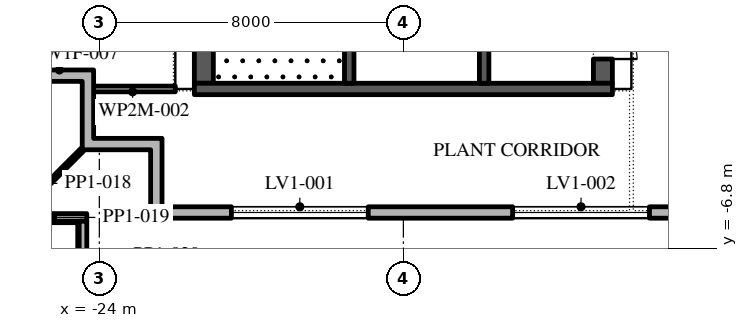
"""IFC4 building model, lengths in metres.
Left out: names, types, materials, properties, quantities, classifications, styles, units other than length and angle.
Written with IfcOpenShell. Run it as: python <this file> out.ifc"""

import sys

from ifc_helpers import new_model, si_unit, direction, frame, frame_2d, origin, place, context, subcontext, project, spatial, polyline, rectangle, outline, extrude, element, fill, save


model = new_model("IFC4")
c1 = context("Model", 3, precision=1e-05, world=origin(), true_north=direction((0.0, 1.0)))
c2 = subcontext(c1, "Body", "Model", "MODEL_VIEW")
j1 = project(units=[si_unit("LENGTHUNIT", "METRE"), si_unit("PLANEANGLEUNIT", "RADIAN")], contexts=[c1])
p1 = place(None, origin())
s1 = spatial("IfcSite", under=j1, at=p1, CompositionType="ELEMENT")
p2 = place(p1, origin())
s2 = spatial("IfcBuilding", under=s1, at=p2, CompositionType="ELEMENT")
p3 = place(p2, frame((0.0, 0.0, 363.6)))
s3 = spatial("IfcBuildingStorey", under=s2, at=p3, CompositionType="ELEMENT", Elevation=363.6)
p4 = place(p3, frame((-22.35, -5.85, 0.0), z_axis=(0.0, 0.0, 1.0), x_axis=(1.0, 0.0, 0.0)))
e1 = element("IfcWall", 1, at=p4, inside=s3, PredefinedType="STANDARD", context=c2, shape_type="SweptSolid", body=[
    extrude(rectangle(XDim=45.0, YDim=0.3, at=frame_2d((22.5, 0.0))), origin(), (0.0, 0.0, 1.0), 5.2),
])
p5 = place(p4, frame((1.825, 0.0, 0.6)))
e2 = element("IfcOpeningElement", 2, at=p5, cuts=e1, PredefinedType="OPENING", context=c2, shape_type="SweptSolid", body=[
    extrude(rectangle(XDim=3.6, YDim=4.15, at=frame_2d((1.8, 2.075))), frame((0.0, 0.16, 0.0), z_axis=(0.0, -1.0, 0.0), x_axis=(1.0, 0.0, 0.0)), (0.0, 0.0, 1.0), 0.32),
])
p6 = place(p4, frame((9.225, 0.0, 0.6)))
e3 = element("IfcOpeningElement", 3, at=p6, cuts=e1, PredefinedType="OPENING", context=c2, shape_type="SweptSolid", body=[
    extrude(rectangle(XDim=3.6, YDim=4.15, at=frame_2d((1.8, 2.075))), frame((0.0, 0.16, 0.0), z_axis=(0.0, -1.0, 0.0), x_axis=(1.0, 0.0, 0.0)), (0.0, 0.0, 1.0), 0.32),
])
p7 = place(p4, frame((16.775, 0.0, 0.6)))
e4 = element("IfcOpeningElement", 4, at=p7, cuts=e1, PredefinedType="OPENING", context=c2, shape_type="SweptSolid", body=[
    extrude(rectangle(XDim=3.6, YDim=4.15, at=frame_2d((1.8, 2.075))), frame((0.0, 0.16, 0.0), z_axis=(0.0, -1.0, 0.0), x_axis=(1.0, 0.0, 0.0)), (0.0, 0.0, 1.0), 0.32),
])
p8 = place(p4, frame((24.325, 0.0, 0.6)))
e5 = element("IfcOpeningElement", 5, at=p8, cuts=e1, PredefinedType="OPENING", context=c2, shape_type="SweptSolid", body=[
    extrude(rectangle(XDim=3.6, YDim=4.15, at=frame_2d((1.8, 2.075))), frame((0.0, 0.16, 0.0), z_axis=(0.0, -1.0, 0.0), x_axis=(1.0, 0.0, 0.0)), (0.0, 0.0, 1.0), 0.32),
])
p9 = place(p4, frame((31.875, 0.0, 0.6)))
e6 = element("IfcOpeningElement", 6, at=p9, cuts=e1, PredefinedType="OPENING", context=c2, shape_type="SweptSolid", body=[
    extrude(rectangle(XDim=3.6, YDim=4.15, at=frame_2d((1.8, 2.075))), frame((0.0, 0.16, 0.0), z_axis=(0.0, -1.0, 0.0), x_axis=(1.0, 0.0, 0.0)), (0.0, 0.0, 1.0), 0.32),
])
p10 = place(p4, frame((39.425, 0.0, 0.6)))
e7 = element("IfcOpeningElement", 7, at=p10, cuts=e1, PredefinedType="OPENING", context=c2, shape_type="SweptSolid", body=[
    extrude(rectangle(XDim=3.6, YDim=4.15, at=frame_2d((1.8, 2.075))), frame((0.0, 0.16, 0.0), z_axis=(0.0, -1.0, 0.0), x_axis=(1.0, 0.0, 0.0)), (0.0, 0.0, 1.0), 0.32),
])
p11 = place(p3, origin())
e8 = element("IfcWall", 8, at=p11, inside=s3, PredefinedType="STANDARD", context=c2, shape_type="SweptSolid", body=[
    extrude(outline(polyline([(-22.65, -4.2), (-24.45, -4.2), (-24.45, -2.4), (-25.95, -2.4), (-25.95, -2.1), (-24.15, -2.1), (-24.15, -3.9), (-22.35, -3.9), (-22.35, -6.0), (-22.65, -6.0), (-22.65, -4.2)])), origin(), (0.0, 0.0, 1.0), 5.2),
])
for number, where, z_axis, x_axis in (
    (9, (-26.13, -5.98, -0.05), (0.0, 0.0, 1.0), (1.0, 0.0, 0.0)),
    (10, (-24.43, -6.08, -0.05), (0.0, 0.0, 1.0), (0.0, -1.0, 0.0)),
):
    element("IfcWall", number, at=place(p3, frame(where, z_axis=z_axis, x_axis=x_axis)), inside=s3, PredefinedType="STANDARD", context=c2, shape_type="SweptSolid", body=[
        extrude(rectangle(XDim=1.8, YDim=0.2, at=frame_2d((0.9, 0.0))), origin(), (0.0, 0.0, 1.0), 1.1),
    ])
p12 = place(p3, frame((-24.45, -4.2, -0.05), z_axis=(0.0, 0.0, 1.0), x_axis=(-0.707106781187, -0.707106781187, 0.0)))
e11 = element("IfcWall", 11, at=p12, inside=s3, PredefinedType="STANDARD", context=c2, shape_type="SweptSolid", body=[
    extrude(rectangle(XDim=2.667, YDim=0.1, at=frame_2d((1.333, 0.0))), origin(), (0.0, 0.0, 1.0), 5.25),
])
p13 = place(p3, frame((-21.25, -2.45, 0.0), z_axis=(0.0, 0.0, 1.0), x_axis=(0.0, 1.0, 0.0)))
e12 = element("IfcWall", 12, at=p13, inside=s3, PredefinedType="SHEAR", context=c2, shape_type="SweptSolid", body=[
    extrude(rectangle(XDim=27.9, YDim=0.5, at=frame_2d((13.95, 0.0))), origin(), (0.0, 0.0, 1.0), 5.2),
])
p14 = place(p13, frame((5.05, 0.0, 0.0)))
e13 = element("IfcOpeningElement", 13, at=p14, cuts=e12, PredefinedType="OPENING", context=c2, shape_type="SweptSolid", body=[
    extrude(rectangle(XDim=1.2, YDim=2.1, at=frame_2d((0.6, 1.05))), frame((0.0, 0.26, 0.0), z_axis=(0.0, -1.0, 0.0), x_axis=(1.0, 0.0, 0.0)), (0.0, 0.0, 1.0), 0.52),
])
p15 = place(p13, frame((21.65, 0.0, 0.0)))
e14 = element("IfcOpeningElement", 14, at=p15, cuts=e12, PredefinedType="OPENING", context=c2, shape_type="SweptSolid", body=[
    extrude(rectangle(XDim=1.2, YDim=2.1, at=frame_2d((0.6, 1.05))), frame((0.0, 0.26, 0.0), z_axis=(0.0, -1.0, 0.0), x_axis=(1.0, 0.0, 0.0)), (0.0, 0.0, 1.0), 0.52),
])
p16 = place(p3, frame((-10.75, -2.45, 0.0), z_axis=(0.0, 0.0, 1.0), x_axis=(0.0, 1.0, 0.0)))
e15 = element("IfcWall", 15, at=p16, inside=s3, PredefinedType="SHEAR", context=c2, shape_type="SweptSolid", body=[
    extrude(rectangle(XDim=27.9, YDim=0.5, at=frame_2d((13.95, 0.0))), origin(), (0.0, 0.0, 1.0), 5.2),
])
p17 = place(p16, frame((23.65, 0.0, 0.0)))
e16 = element("IfcOpeningElement", 16, at=p17, cuts=e15, PredefinedType="OPENING", context=c2, shape_type="SweptSolid", body=[
    extrude(rectangle(XDim=2.4, YDim=2.1, at=frame_2d((1.2, 1.05))), frame((0.0, 0.26, 0.0), z_axis=(0.0, -1.0, 0.0), x_axis=(1.0, 0.0, 0.0)), (0.0, 0.0, 1.0), 0.52),
])
p18 = place(p16, frame((0.637, 0.0, 0.0)))
e17 = element("IfcOpeningElement", 17, at=p18, cuts=e15, PredefinedType="OPENING", context=c2, shape_type="SweptSolid", body=[
    extrude(rectangle(XDim=1.8, YDim=2.4, at=frame_2d((0.9, 1.2))), frame((0.0, 0.26, 0.0), z_axis=(0.0, -1.0, 0.0), x_axis=(1.0, 0.0, 0.0)), (0.0, 0.0, 1.0), 0.52),
])
p19 = place(p16, frame((3.863, 0.0, 0.0)))
e18 = element("IfcOpeningElement", 18, at=p19, cuts=e15, PredefinedType="OPENING", context=c2, shape_type="SweptSolid", body=[
    extrude(rectangle(XDim=1.8, YDim=2.4, at=frame_2d((0.9, 1.2))), frame((0.0, 0.26, 0.0), z_axis=(0.0, -1.0, 0.0), x_axis=(1.0, 0.0, 0.0)), (0.0, 0.0, 1.0), 0.52),
])
p20 = place(p3, frame((-21.5, -2.6, 0.0), z_axis=(0.0, 0.0, 1.0), x_axis=(1.0, 0.0, 0.0)))
e19 = element("IfcWall", 19, at=p20, inside=s3, PredefinedType="SHEAR", context=c2, shape_type="SweptSolid", body=[
    extrude(rectangle(XDim=11.0, YDim=0.3, at=frame_2d((5.5, 0.0))), origin(), (0.0, 0.0, 1.0), 5.2),
])
p21 = place(p3, frame((-17.425, -2.45, 0.0), z_axis=(0.0, 0.0, 1.0), x_axis=(0.0, 1.0, 0.0)))
e20 = element("IfcWall", 20, at=p21, inside=s3, PredefinedType="SHEAR", context=c2, shape_type="SweptSolid", body=[
    extrude(rectangle(XDim=6.3, YDim=0.25, at=frame_2d((3.15, 0.0))), origin(), (0.0, 0.0, 1.0), 5.2),
])
p22 = place(p21, frame((5.05, 0.0, 0.0)))
e21 = element("IfcOpeningElement", 21, at=p22, cuts=e20, PredefinedType="OPENING", context=c2, shape_type="SweptSolid", body=[
    extrude(rectangle(XDim=1.2, YDim=2.1, at=frame_2d((0.6, 1.05))), frame((0.0, 0.135, 0.0), z_axis=(0.0, -1.0, 0.0), x_axis=(1.0, 0.0, 0.0)), (0.0, 0.0, 1.0), 0.27),
])
p23 = place(p3, frame((-13.875, -2.45, 0.0), z_axis=(0.0, 0.0, 1.0), x_axis=(0.0, 1.0, 0.0)))
e22 = element("IfcWall", 22, at=p23, inside=s3, PredefinedType="SHEAR", context=c2, shape_type="SweptSolid", body=[
    extrude(rectangle(XDim=21.3, YDim=0.25, at=frame_2d((10.65, 0.0))), origin(), (0.0, 0.0, 1.0), 5.2),
])
p24 = place(p23, frame((10.907, 0.0, 0.0)))
e23 = element("IfcOpeningElement", 23, at=p24, cuts=e22, PredefinedType="OPENING", context=c2, shape_type="SweptSolid", body=[
    extrude(rectangle(XDim=1.8, YDim=2.4, at=frame_2d((0.9, 1.2))), frame((0.0, 0.135, 0.0), z_axis=(0.0, -1.0, 0.0), x_axis=(1.0, 0.0, 0.0)), (0.0, 0.0, 1.0), 0.27),
])
p25 = place(p23, frame((6.971, 0.0, 0.0)))
e24 = element("IfcOpeningElement", 24, at=p25, cuts=e22, PredefinedType="OPENING", context=c2, shape_type="SweptSolid", body=[
    extrude(rectangle(XDim=1.1, YDim=2.1, at=frame_2d((0.55, 1.05))), frame((0.0, 0.135, 0.0), z_axis=(0.0, -1.0, 0.0), x_axis=(1.0, 0.0, 0.0)), (0.0, 0.0, 1.0), 0.27),
])
p26 = place(p3, frame((-24.25, -2.6, 0.0), z_axis=(0.0, 0.0, 1.0), x_axis=(1.0, 0.0, 0.0)))
e25 = element("IfcWall", 25, at=p26, inside=s3, PredefinedType="PARTITIONING", context=c2, shape_type="SweptSolid", body=[
    extrude(rectangle(XDim=2.25, YDim=0.15, at=frame_2d((1.125, 0.0))), origin(), (0.0, 0.0, 1.0), 5.2),
])
p27 = place(p5, origin())
e26 = element("IfcWindow", 26, at=p27, inside=s3, PartitioningType="DOUBLE_PANEL_HORIZONTAL", PredefinedType="WINDOW", context=c2, shape_type="SweptSolid", body=[
    extrude(rectangle(XDim=3.6, YDim=4.15, at=frame_2d((1.8, 2.075))), frame((0.0, 0.03, 0.0), z_axis=(0.0, -1.0, 0.0), x_axis=(1.0, 0.0, 0.0)), (0.0, 0.0, 1.0), 0.06),
])
fill(e2, e26)
p28 = place(p6, origin())
e27 = element("IfcWindow", 27, at=p28, inside=s3, PartitioningType="DOUBLE_PANEL_HORIZONTAL", PredefinedType="WINDOW", context=c2, shape_type="SweptSolid", body=[
    extrude(rectangle(XDim=3.6, YDim=4.15, at=frame_2d((1.8, 2.075))), frame((0.0, 0.03, 0.0), z_axis=(0.0, -1.0, 0.0), x_axis=(1.0, 0.0, 0.0)), (0.0, 0.0, 1.0), 0.06),
])
fill(e3, e27)
p29 = place(p18, frame((1.8, 0.45, 0.0), z_axis=(0.0, 0.0, 1.0), x_axis=(-1.0, 0.0, 0.0)))
e28 = element("IfcDoor", 28, at=p29, inside=s3, OperationType="DOUBLE_DOOR_SINGLE_SWING", PredefinedType="DOOR", context=c2, shape_type="SweptSolid", body=[
    extrude(rectangle(XDim=1.8, YDim=2.4, at=frame_2d((0.9, 1.2))), frame((0.0, 0.25, 0.0), z_axis=(0.0, -1.0, 0.0), x_axis=(1.0, 0.0, 0.0)), (0.0, 0.0, 1.0), 0.05),
])
fill(e17, e28)
save(model, sys.argv[1])
